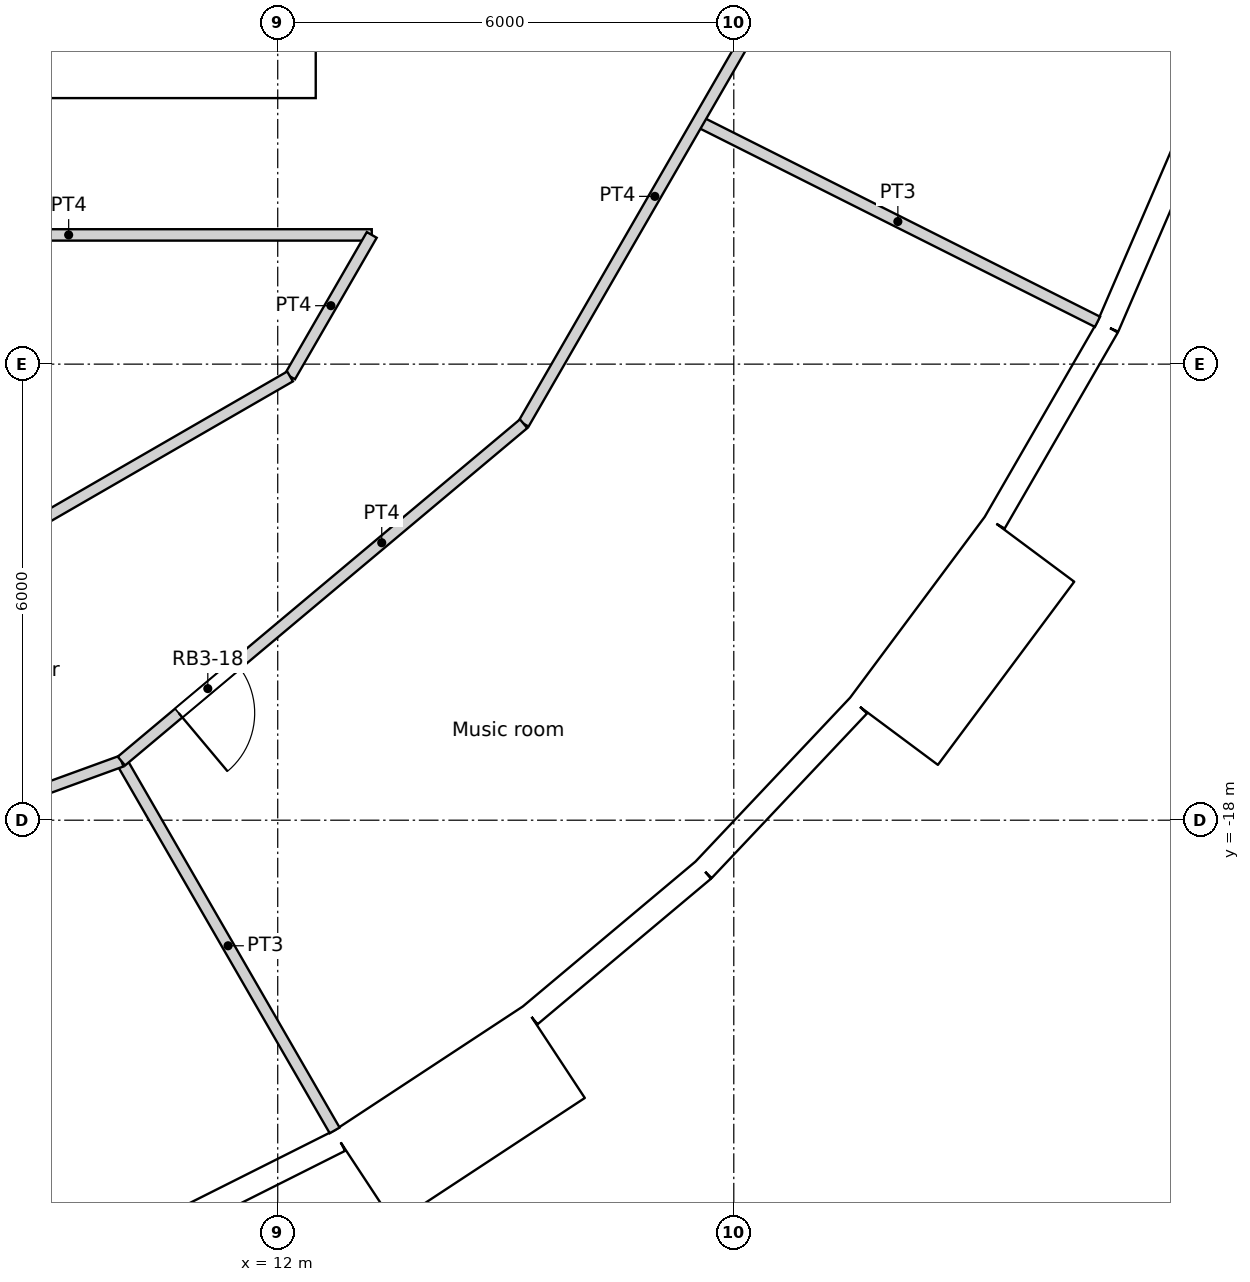
"""IFC4 building model, lengths in metres.
Left out: names, types, materials, properties, quantities, classifications, styles, units other than length and angle.
Written with IfcOpenShell. Run it as: python <this file> out.ifc"""

import sys

from ifc_helpers import new_model, si_unit, direction, frame, frame_2d, origin, origin_2d, place, context, subcontext, project, spatial, rectangle, circle, extrude, element, fill, save


model = new_model("IFC4")
c1 = context("Model", 3, precision=1e-05, world=origin(), true_north=direction((0.0, 1.0)))
c2 = subcontext(c1, "Body", "Model", "MODEL_VIEW")
j1 = project(units=[si_unit("LENGTHUNIT", "METRE"), si_unit("PLANEANGLEUNIT", "RADIAN")], contexts=[c1])
p1 = place(None, origin())
s1 = spatial("IfcSite", under=j1, at=p1, CompositionType="ELEMENT")
p2 = place(p1, origin())
s2 = spatial("IfcBuilding", under=s1, at=p2, CompositionType="ELEMENT")
p3 = place(p2, frame((0.0, 0.0, 147.6)))
s3 = spatial("IfcBuildingStorey", under=s2, at=p3, CompositionType="ELEMENT", Elevation=147.6)
for number, where, z_axis, x_axis in (
    (1, (9.723, -22.54, 0.0), (0.0, 0.0, 1.0), (1.0, 0.0, 0.0)),
    (2, (14.659, -19.69, 0.0), (0.0, 0.0, 1.0), (1.0, 0.0, 0.0)),
    (3, (18.805, -15.779, 0.0), (0.0, 0.0, 1.0), (1.0, 0.0, 0.0)),
    (4, (21.937, -11.017, 0.0), (0.0, 0.0, 1.0), (1.0, 0.0, 0.0)),
):
    element("IfcColumn", number, at=place(p3, frame(where, z_axis=z_axis, x_axis=x_axis)), inside=s3, PredefinedType="COLUMN", context=c2, shape_type="SweptSolid", body=[
        extrude(circle(Radius=0.6, at=origin_2d()), origin(), (0.0, 0.0, 1.0), 3.6),
    ])
for number, where, z_axis, x_axis in (
    (5, (11.735, -14.716, 0.0), (0.0, 0.0, 1.0), (1.0, 0.0, 0.0)),
    (6, (15.552, -10.603, 0.0), (0.0, 0.0, 1.0), (1.0, 0.0, 0.0)),
):
    element("IfcColumn", number, at=place(p3, frame(where, z_axis=z_axis, x_axis=x_axis)), inside=s3, PredefinedType="COLUMN", context=c2, shape_type="SweptSolid", body=[
        extrude(circle(Radius=0.65, at=origin_2d()), origin(), (0.0, 0.0, 1.0), 3.6),
    ])
p4 = place(p3, frame((10.158, -23.55, 0.0), z_axis=(0.0, 0.0, 1.0), x_axis=(0.893637442555, 0.448789618045, 0.0)))
e7 = element("IfcWall", 7, at=p4, inside=s3, PredefinedType="SOLIDWALL", context=c2, shape_type="SweptSolid", body=[
    extrude(rectangle(XDim=2.973, YDim=0.3, at=frame_2d((1.486, 0.0))), origin(), (0.0, 0.0, 1.0), 3.3),
])
p5 = place(p4, frame((1.486, 0.0, 1.55)))
e8 = element("IfcOpeningElement", 8, at=p5, cuts=e7, PredefinedType="OPENING", context=c2, shape_type="SweptSolid", body=[
    extrude(circle(Radius=0.9, at=origin_2d()), frame((0.0, 0.16, 0.0), z_axis=(0.0, -1.0, 0.0), x_axis=(1.0, 0.0, 0.0)), (0.0, 0.0, 1.0), 0.32),
])
p6 = place(p3, frame((13.132, -22.697, -0.3), z_axis=(0.0, 0.0, 1.0), x_axis=(0.835514416706, 0.549468524554, 0.0)))
e9 = element("IfcWall", 9, at=p6, inside=s3, PredefinedType="ELEMENTEDWALL", context=c2, shape_type="SweptSolid", body=[
    extrude(rectangle(XDim=3.0, YDim=1.45, at=frame_2d((1.5, 0.0))), origin(), (0.0, 0.0, 1.0), 3.6),
])
p7 = place(p6, frame((1.5, 0.0, 1.85)))
e10 = element("IfcOpeningElement", 10, at=p7, cuts=e9, PredefinedType="OPENING", context=c2, shape_type="SweptSolid", body=[
    extrude(circle(Radius=0.9, at=origin_2d()), frame((0.0, 0.735, 0.0), z_axis=(0.0, -1.0, 0.0), x_axis=(1.0, 0.0, 0.0)), (0.0, 0.0, 1.0), 1.47),
])
p8 = place(p3, frame((15.323, -20.566, 0.0), z_axis=(0.0, 0.0, 1.0), x_axis=(0.766049350637, 0.642781761089, 0.0)))
e11 = element("IfcWall", 11, at=p8, inside=s3, PredefinedType="SOLIDWALL", context=c2, shape_type="SweptSolid", body=[
    extrude(rectangle(XDim=2.973, YDim=0.3, at=frame_2d((1.486, 0.0))), origin(), (0.0, 0.0, 1.0), 3.3),
])
p9 = place(p8, frame((1.486, 0.0, 1.55)))
e12 = element("IfcOpeningElement", 12, at=p9, cuts=e11, PredefinedType="OPENING", context=c2, shape_type="SweptSolid", body=[
    extrude(circle(Radius=0.9, at=origin_2d()), frame((0.0, 0.16, 0.0), z_axis=(0.0, -1.0, 0.0), x_axis=(1.0, 0.0, 0.0)), (0.0, 0.0, 1.0), 0.32),
])
p10 = place(p3, frame((17.6, -18.655, 0.0), z_axis=(0.0, 0.0, 1.0), x_axis=(0.686235184166, 0.727379730273, 0.0)))
e13 = element("IfcWall", 13, at=p10, inside=s3, PredefinedType="SOLIDWALL", context=c2, shape_type="SweptSolid", body=[
    extrude(rectangle(XDim=2.973, YDim=0.3, at=frame_2d((1.486, 0.0))), origin(), (0.0, 0.0, 1.0), 3.3),
])
p11 = place(p10, frame((1.486, 0.0, 1.55)))
e14 = element("IfcOpeningElement", 14, at=p11, cuts=e13, PredefinedType="OPENING", context=c2, shape_type="SweptSolid", body=[
    extrude(circle(Radius=0.9, at=origin_2d()), frame((0.0, 0.16, 0.0), z_axis=(0.0, -1.0, 0.0), x_axis=(1.0, 0.0, 0.0)), (0.0, 0.0, 1.0), 0.32),
])
p12 = place(p3, frame((20.103, -16.836, -0.3), z_axis=(0.0, 0.0, 1.0), x_axis=(0.597183717734, 0.802104486506, 0.0)))
e15 = element("IfcWall", 15, at=p12, inside=s3, PredefinedType="ELEMENTEDWALL", context=c2, shape_type="SweptSolid", body=[
    extrude(rectangle(XDim=3.0, YDim=1.45, at=frame_2d((1.5, 0.0))), origin(), (0.0, 0.0, 1.0), 3.6),
])
p13 = place(p12, frame((1.5, 0.0, 1.85)))
e16 = element("IfcOpeningElement", 16, at=p13, cuts=e15, PredefinedType="OPENING", context=c2, shape_type="SweptSolid", body=[
    extrude(circle(Radius=0.9, at=origin_2d()), frame((0.0, 0.735, 0.0), z_axis=(0.0, -1.0, 0.0), x_axis=(1.0, 0.0, 0.0)), (0.0, 0.0, 1.0), 1.47),
])
p14 = place(p3, frame((21.433, -14.085, 0.0), z_axis=(0.0, 0.0, 1.0), x_axis=(0.500016263033, 0.866016014115, 0.0)))
e17 = element("IfcWall", 17, at=p14, inside=s3, PredefinedType="SOLIDWALL", context=c2, shape_type="SweptSolid", body=[
    extrude(rectangle(XDim=2.973, YDim=0.3, at=frame_2d((1.487, 0.0))), origin(), (0.0, 0.0, 1.0), 3.3),
])
p15 = place(p14, frame((1.486, 0.0, 1.55)))
e18 = element("IfcOpeningElement", 18, at=p15, cuts=e17, PredefinedType="OPENING", context=c2, shape_type="SweptSolid", body=[
    extrude(circle(Radius=0.9, at=origin_2d()), frame((0.0, 0.16, 0.0), z_axis=(0.0, -1.0, 0.0), x_axis=(1.0, 0.0, 0.0)), (0.0, 0.0, 1.0), 0.32),
])
p16 = place(p3, frame((22.919, -11.51, 0.0), z_axis=(0.0, 0.0, 1.0), x_axis=(0.396078892785, 0.918216483565, 0.0)))
e19 = element("IfcWall", 19, at=p16, inside=s3, PredefinedType="SOLIDWALL", context=c2, shape_type="SweptSolid", body=[
    extrude(rectangle(XDim=2.973, YDim=0.3, at=frame_2d((1.486, 0.0))), origin(), (0.0, 0.0, 1.0), 3.3),
])
p17 = place(p16, frame((1.486, 0.0, 1.55)))
e20 = element("IfcOpeningElement", 20, at=p17, cuts=e19, PredefinedType="OPENING", context=c2, shape_type="SweptSolid", body=[
    extrude(circle(Radius=0.9, at=origin_2d()), frame((0.0, 0.16, 0.0), z_axis=(0.0, -1.0, 0.0), x_axis=(1.0, 0.0, 0.0)), (0.0, 0.0, 1.0), 0.32),
])
p18 = place(p3, frame((-12.5, -8.05, 0.0), z_axis=(0.0, 0.0, 1.0), x_axis=(1.0, 0.0, 0.0)))
e21 = element("IfcWall", 21, at=p18, inside=s3, PredefinedType="SOLIDWALL", context=c2, shape_type="SweptSolid", body=[
    extrude(rectangle(XDim=25.0, YDim=0.9, at=frame_2d((12.5, 0.0))), origin(), (0.0, 0.0, 1.0), 3.6),
])
p19 = place(p18, frame((13.4, 0.0, 0.0)))
e22 = element("IfcOpeningElement", 22, at=p19, cuts=e21, PredefinedType="OPENING", context=c2, shape_type="SweptSolid", body=[
    extrude(rectangle(XDim=1.0, YDim=2.1, at=frame_2d((0.5, 1.05))), frame((0.0, 0.45, 0.0), z_axis=(0.0, -1.0, 0.0), x_axis=(1.0, 0.0, 0.0)), (0.0, 0.0, 1.0), 0.9),
])
p20 = place(p18, frame((8.3, 0.0, 0.0)))
e23 = element("IfcOpeningElement", 23, at=p20, cuts=e21, PredefinedType="OPENING", context=c2, shape_type="SweptSolid", body=[
    extrude(rectangle(XDim=1.8, YDim=2.1, at=frame_2d((0.9, 1.05))), frame((0.0, 0.45, 0.0), z_axis=(0.0, -1.0, 0.0), x_axis=(1.0, 0.0, 0.0)), (0.0, 0.0, 1.0), 0.9),
])
p21 = place(p18, frame((14.9, 0.0, 0.0)))
e24 = element("IfcOpeningElement", 24, at=p21, cuts=e21, PredefinedType="OPENING", context=c2, shape_type="SweptSolid", body=[
    extrude(rectangle(XDim=1.8, YDim=2.1, at=frame_2d((0.9, 1.05))), frame((0.0, 0.45, 0.0), z_axis=(0.0, -1.0, 0.0), x_axis=(1.0, 0.0, 0.0)), (0.0, 0.0, 1.0), 0.9),
])
p22 = place(p3, frame((-3.025, -10.3, 0.0), z_axis=(0.0, 0.0, 1.0), x_axis=(1.0, 0.0, 0.0)))
e25 = element("IfcWall", 25, at=p22, inside=s3, PredefinedType="PARTITIONING", context=c2, shape_type="SweptSolid", body=[
    extrude(rectangle(XDim=16.262, YDim=0.15, at=frame_2d((8.131, 0.0))), origin(), (0.0, 0.0, 1.0), 3.3),
])
p23 = place(p22, frame((7.287, 0.0, 0.0)))
e26 = element("IfcOpeningElement", 26, at=p23, cuts=e25, PredefinedType="OPENING", context=c2, shape_type="SweptSolid", body=[
    extrude(rectangle(XDim=0.95, YDim=2.1, at=frame_2d((0.475, 1.05))), frame((0.0, 0.075, 0.0), z_axis=(0.0, -1.0, 0.0), x_axis=(1.0, 0.0, 0.0)), (0.0, 0.0, 1.0), 0.15),
])
p24 = place(p3, frame((12.162, -12.162, 0.0), z_axis=(0.0, 0.0, 1.0), x_axis=(0.499961633463, 0.866047553582, 0.0)))
e27 = element("IfcWall", 27, at=p24, inside=s3, PredefinedType="PARTITIONING", context=c2, shape_type="SweptSolid", body=[
    extrude(rectangle(XDim=2.15, YDim=0.15, at=frame_2d((1.075, 0.0))), origin(), (0.0, 0.0, 1.0), 3.3),
])
p25 = place(p3, frame((15.235, -12.784, 0.0), z_axis=(0.0, 0.0, 1.0), x_axis=(0.499914202267, 0.866074933462, 0.0)))
e28 = element("IfcWall", 28, at=p25, inside=s3, PredefinedType="PARTITIONING", context=c2, shape_type="SweptSolid", body=[
    extrude(rectangle(XDim=6.907, YDim=0.15, at=frame_2d((3.454, 0.0))), origin(), (0.0, 0.0, 1.0), 3.3),
])
p26 = place(p3, frame((9.943, -17.222, 0.0), z_axis=(0.0, 0.0, 1.0), x_axis=(0.766192104565, 0.642611592567, 0.0)))
e29 = element("IfcWall", 29, at=p26, inside=s3, PredefinedType="PARTITIONING", context=c2, shape_type="SweptSolid", body=[
    extrude(rectangle(XDim=6.906, YDim=0.15, at=frame_2d((3.453, 0.0))), origin(), (0.0, 0.0, 1.0), 3.3),
])
p27 = place(p26, frame((0.984, 0.0, 0.0)))
e30 = element("IfcOpeningElement", 30, at=p27, cuts=e29, PredefinedType="OPENING", context=c2, shape_type="SweptSolid", body=[
    extrude(rectangle(XDim=1.0, YDim=2.04, at=frame_2d((0.5, 1.02))), frame((0.0, 0.075, 0.0), z_axis=(0.0, -1.0, 0.0), x_axis=(1.0, 0.0, 0.0)), (0.0, 0.0, 1.0), 0.15),
])
p28 = place(p3, frame((4.452, -16.614, 0.0), z_axis=(0.0, 0.0, 1.0), x_axis=(0.866005203721, 0.500034985904, 0.0)))
e31 = element("IfcWall", 31, at=p28, inside=s3, PredefinedType="PARTITIONING", context=c2, shape_type="SweptSolid", body=[
    extrude(rectangle(XDim=8.903, YDim=0.15, at=frame_2d((4.452, 0.0))), origin(), (0.0, 0.0, 1.0), 3.3),
])
p29 = place(p3, frame((3.453, -19.586, 0.0), z_axis=(0.0, 0.0, 1.0), x_axis=(0.939672634566, 0.342075050021, 0.0)))
e32 = element("IfcWall", 32, at=p29, inside=s3, PredefinedType="PARTITIONING", context=c2, shape_type="SweptSolid", body=[
    extrude(rectangle(XDim=6.908, YDim=0.15, at=frame_2d((3.454, 0.0))), origin(), (0.0, 0.0, 1.0), 3.3),
])
p30 = place(p29, frame((1.904, 0.0, 0.0)))
e33 = element("IfcOpeningElement", 33, at=p30, cuts=e32, PredefinedType="OPENING", context=c2, shape_type="SweptSolid", body=[
    extrude(rectangle(XDim=1.0, YDim=2.04, at=frame_2d((0.5, 1.02))), frame((0.0, 0.075, 0.0), z_axis=(0.0, -1.0, 0.0), x_axis=(1.0, 0.0, 0.0)), (0.0, 0.0, 1.0), 0.15),
])
p31 = place(p3, frame((9.944, -17.223, 0.0), z_axis=(0.0, 0.0, 1.0), x_axis=(0.500010020406, -0.866019618423, 0.0)))
e34 = element("IfcWall", 34, at=p31, inside=s3, PredefinedType="PARTITIONING", context=c2, shape_type="SweptSolid", body=[
    extrude(rectangle(XDim=5.61, YDim=0.15, at=frame_2d((2.805, 0.0))), origin(), (0.0, 0.0, 1.0), 3.3),
])
p32 = place(p3, frame((17.532, -8.805, 0.0), z_axis=(0.0, 0.0, 1.0), x_axis=(0.893628331628, -0.448807759415, 0.0)))
e35 = element("IfcWall", 35, at=p32, inside=s3, PredefinedType="PARTITIONING", context=c2, shape_type="SweptSolid", body=[
    extrude(rectangle(XDim=5.878, YDim=0.15, at=frame_2d((2.939, 0.0))), origin(), (0.0, 0.0, 1.0), 3.3),
])
p33 = place(p5, origin())
e36 = element("IfcWindow", 36, at=p33, inside=s3, PartitioningType="SINGLE_PANEL", PredefinedType="WINDOW", context=c2, shape_type="SweptSolid", body=[
    extrude(circle(Radius=0.9, at=origin_2d()), frame((0.0, 0.12, 0.0), z_axis=(0.0, -1.0, 0.0), x_axis=(1.0, 0.0, 0.0)), (0.0, 0.0, 1.0), 0.1),
])
fill(e8, e36)
p34 = place(p7, origin())
e37 = element("IfcWindow", 37, at=p34, inside=s3, PartitioningType="SINGLE_PANEL", PredefinedType="WINDOW", context=c2, shape_type="SweptSolid", body=[
    extrude(circle(Radius=0.9, at=origin_2d()), frame((0.0, 0.695, 0.0), z_axis=(0.0, -1.0, 0.0), x_axis=(1.0, 0.0, 0.0)), (0.0, 0.0, 1.0), 0.1),
])
fill(e10, e37)
p35 = place(p9, origin())
e38 = element("IfcWindow", 38, at=p35, inside=s3, PartitioningType="SINGLE_PANEL", PredefinedType="WINDOW", context=c2, shape_type="SweptSolid", body=[
    extrude(circle(Radius=0.9, at=origin_2d()), frame((0.0, 0.12, 0.0), z_axis=(0.0, -1.0, 0.0), x_axis=(1.0, 0.0, 0.0)), (0.0, 0.0, 1.0), 0.1),
])
fill(e12, e38)
p36 = place(p11, origin())
e39 = element("IfcWindow", 39, at=p36, inside=s3, PartitioningType="SINGLE_PANEL", PredefinedType="WINDOW", context=c2, shape_type="SweptSolid", body=[
    extrude(circle(Radius=0.9, at=origin_2d()), frame((0.0, 0.12, 0.0), z_axis=(0.0, -1.0, 0.0), x_axis=(1.0, 0.0, 0.0)), (0.0, 0.0, 1.0), 0.1),
])
fill(e14, e39)
p37 = place(p13, origin())
e40 = element("IfcWindow", 40, at=p37, inside=s3, PartitioningType="SINGLE_PANEL", PredefinedType="WINDOW", context=c2, shape_type="SweptSolid", body=[
    extrude(circle(Radius=0.9, at=origin_2d()), frame((0.0, 0.695, 0.0), z_axis=(0.0, -1.0, 0.0), x_axis=(1.0, 0.0, 0.0)), (0.0, 0.0, 1.0), 0.1),
])
fill(e16, e40)
p38 = place(p15, origin())
e41 = element("IfcWindow", 41, at=p38, inside=s3, PartitioningType="SINGLE_PANEL", PredefinedType="WINDOW", context=c2, shape_type="SweptSolid", body=[
    extrude(circle(Radius=0.9, at=origin_2d()), frame((0.0, 0.12, 0.0), z_axis=(0.0, -1.0, 0.0), x_axis=(1.0, 0.0, 0.0)), (0.0, 0.0, 1.0), 0.1),
])
fill(e18, e41)
p39 = place(p17, origin())
e42 = element("IfcWindow", 42, at=p39, inside=s3, PartitioningType="SINGLE_PANEL", PredefinedType="WINDOW", context=c2, shape_type="SweptSolid", body=[
    extrude(circle(Radius=0.9, at=origin_2d()), frame((0.0, 0.12, 0.0), z_axis=(0.0, -1.0, 0.0), x_axis=(1.0, 0.0, 0.0)), (0.0, 0.0, 1.0), 0.1),
])
fill(e20, e42)
p40 = place(p27, origin())
e43 = element("IfcDoor", 43, at=p40, inside=s3, OperationType="SINGLE_SWING_RIGHT", PredefinedType="DOOR", context=c2, shape_type="SweptSolid", body=[
    extrude(rectangle(XDim=1.0, YDim=2.04, at=frame_2d((0.5, 1.02))), frame((0.0, 0.025, 0.0), z_axis=(0.0, -1.0, 0.0), x_axis=(1.0, 0.0, 0.0)), (0.0, 0.0, 1.0), 0.05),
])
fill(e30, e43)
save(model, sys.argv[1])
